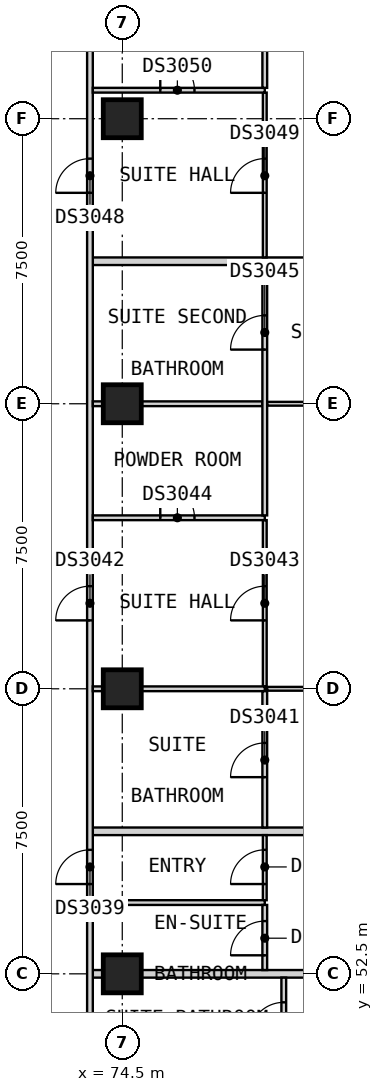
"""IFC4 building model, lengths in metres.
Left out: names, types, materials, properties, quantities, classifications, styles, units other than length and angle.
Written with IfcOpenShell. Run it as: python <this file> out.ifc"""

import sys

from ifc_helpers import new_model, si_unit, direction, frame, frame_2d, origin, origin_2d, place, context, subcontext, project, spatial, rectangle, extrude, element, fill, save


model = new_model("IFC4")
c1 = context("Model", 3, precision=1e-05, world=origin(), true_north=direction((0.0, 1.0)))
c2 = subcontext(c1, "Body", "Model", "MODEL_VIEW")
j1 = project(units=[si_unit("LENGTHUNIT", "METRE"), si_unit("PLANEANGLEUNIT", "RADIAN")], contexts=[c1])
p1 = place(None, origin())
s1 = spatial("IfcSite", under=j1, at=p1, CompositionType="ELEMENT")
p2 = place(p1, origin())
s2 = spatial("IfcBuilding", under=s1, at=p2, CompositionType="ELEMENT")
p3 = place(p2, frame((0.0, 0.0, 137.4)))
s3 = spatial("IfcBuildingStorey", under=s2, at=p3, CompositionType="ELEMENT", Elevation=137.4)
for number, where, z_axis, x_axis in (
    (1, (74.5, 52.5, 0.0), (0.0, 0.0, 1.0), (1.0, 0.0, 0.0)),
    (2, (74.5, 60.0, 0.0), (0.0, 0.0, 1.0), (1.0, 0.0, 0.0)),
    (3, (74.5, 67.5, 0.0), (0.0, 0.0, 1.0), (1.0, 0.0, 0.0)),
    (4, (74.5, 75.0, 0.0), (0.0, 0.0, 1.0), (1.0, 0.0, 0.0)),
):
    element("IfcColumn", number, at=place(p3, frame(where, z_axis=z_axis, x_axis=x_axis)), inside=s3, PredefinedType="COLUMN", context=c2, shape_type="SweptSolid", body=[
        extrude(rectangle(XDim=1.0, YDim=1.0, at=origin_2d()), origin(), (0.0, 0.0, 1.0), 3.6),
    ])
p4 = place(p3, frame((73.725, 52.5, 0.0), z_axis=(0.0, 0.0, 1.0), x_axis=(1.0, 0.0, 0.0)))
e5 = element("IfcWall", 5, at=p4, inside=s3, PredefinedType="PARTITIONING", context=c2, shape_type="SweptSolid", body=[
    extrude(rectangle(XDim=12.525, YDim=0.2, at=frame_2d((6.262, 0.0))), origin(), (0.0, 0.0, 1.0), 3.35),
])
for number, where, z_axis, x_axis in (
    (6, (73.725, 56.25, 0.0), (0.0, 0.0, 1.0), (1.0, 0.0, 0.0)),
    (7, (73.725, 71.25, 0.0), (0.0, 0.0, 1.0), (1.0, 0.0, 0.0)),
):
    element("IfcWall", number, at=place(p3, frame(where, z_axis=z_axis, x_axis=x_axis)), inside=s3, PredefinedType="PARTITIONING", context=c2, shape_type="SweptSolid", body=[
        extrude(rectangle(XDim=11.715, YDim=0.2, at=frame_2d((5.857, 0.0))), origin(), (0.0, 0.0, 1.0), 3.35),
    ])
p5 = place(p3, frame((73.65, 50.175, 0.0), z_axis=(0.0, 0.0, 1.0), x_axis=(0.0, 1.0, 0.0)))
e8 = element("IfcWall", 8, at=p5, inside=s3, PredefinedType="PARTITIONING", context=c2, shape_type="SweptSolid", body=[
    extrude(rectangle(XDim=38.4, YDim=0.15, at=frame_2d((19.2, 0.0))), origin(), (0.0, 0.0, 1.0), 3.35),
])
p6 = place(p5, frame((4.688, 0.0, 0.0)))
e9 = element("IfcOpeningElement", 9, at=p6, cuts=e8, PredefinedType="OPENING", context=c2, shape_type="SweptSolid", body=[
    extrude(rectangle(XDim=0.9, YDim=2.1, at=frame_2d((0.45, 1.05))), frame((0.0, 0.085, 0.0), z_axis=(0.0, -1.0, 0.0), x_axis=(1.0, 0.0, 0.0)), (0.0, 0.0, 1.0), 0.17),
])
p7 = place(p5, frame((11.625, 0.0, 0.0)))
e10 = element("IfcOpeningElement", 10, at=p7, cuts=e8, PredefinedType="OPENING", context=c2, shape_type="SweptSolid", body=[
    extrude(rectangle(XDim=0.9, YDim=2.1, at=frame_2d((0.45, 1.05))), frame((0.0, 0.085, 0.0), z_axis=(0.0, -1.0, 0.0), x_axis=(1.0, 0.0, 0.0)), (0.0, 0.0, 1.0), 0.17),
])
p8 = place(p5, frame((22.875, 0.0, 0.0)))
e11 = element("IfcOpeningElement", 11, at=p8, cuts=e8, PredefinedType="OPENING", context=c2, shape_type="SweptSolid", body=[
    extrude(rectangle(XDim=0.9, YDim=2.1, at=frame_2d((0.45, 1.05))), frame((0.0, 0.085, 0.0), z_axis=(0.0, -1.0, 0.0), x_axis=(1.0, 0.0, 0.0)), (0.0, 0.0, 1.0), 0.17),
])
p9 = place(p5, frame((34.688, 0.0, 0.0)))
e12 = element("IfcOpeningElement", 12, at=p9, cuts=e8, PredefinedType="OPENING", context=c2, shape_type="SweptSolid", body=[
    extrude(rectangle(XDim=0.9, YDim=2.1, at=frame_2d((0.45, 1.05))), frame((0.0, 0.085, 0.0), z_axis=(0.0, -1.0, 0.0), x_axis=(1.0, 0.0, 0.0)), (0.0, 0.0, 1.0), 0.17),
])
p10 = place(p3, frame((78.312, 60.0, 0.0), z_axis=(0.0, 0.0, 1.0), x_axis=(1.0, 0.0, 0.0)))
e13 = element("IfcWall", 13, at=p10, inside=s3, PredefinedType="PARTITIONING", context=c2, shape_type="SweptSolid", body=[
    extrude(rectangle(XDim=7.938, YDim=0.1, at=frame_2d((3.969, 0.0))), origin(), (0.0, 0.0, 1.0), 3.35),
])
p11 = place(p10, frame((4.238, 0.0, 0.0)))
e14 = element("IfcOpeningElement", 14, at=p11, cuts=e13, PredefinedType="OPENING", context=c2, shape_type="SweptSolid", body=[
    extrude(rectangle(XDim=0.9, YDim=2.1, at=frame_2d((0.45, 1.05))), frame((0.0, 0.06, 0.0), z_axis=(0.0, -1.0, 0.0), x_axis=(1.0, 0.0, 0.0)), (0.0, 0.0, 1.0), 0.12),
])
p12 = place(p3, frame((78.312, 67.5, 0.0), z_axis=(0.0, 0.0, 1.0), x_axis=(1.0, 0.0, 0.0)))
e15 = element("IfcWall", 15, at=p12, inside=s3, PredefinedType="PARTITIONING", context=c2, shape_type="SweptSolid", body=[
    extrude(rectangle(XDim=7.938, YDim=0.1, at=frame_2d((3.969, 0.0))), origin(), (0.0, 0.0, 1.0), 3.35),
])
p13 = place(p12, frame((4.238, 0.0, 0.0)))
e16 = element("IfcOpeningElement", 16, at=p13, cuts=e15, PredefinedType="OPENING", context=c2, shape_type="SweptSolid", body=[
    extrude(rectangle(XDim=0.9, YDim=2.1, at=frame_2d((0.45, 1.05))), frame((0.0, 0.06, 0.0), z_axis=(0.0, -1.0, 0.0), x_axis=(1.0, 0.0, 0.0)), (0.0, 0.0, 1.0), 0.12),
])
p14 = place(p3, frame((78.25, 54.438, 0.0), z_axis=(0.0, 0.0, 1.0), x_axis=(0.0, 1.0, 0.0)))
e17 = element("IfcWall", 17, at=p14, inside=s3, PredefinedType="PARTITIONING", context=c2, shape_type="SweptSolid", body=[
    extrude(rectangle(XDim=1.712, YDim=0.1, at=frame_2d((0.856, 0.0))), origin(), (0.0, 0.0, 1.0), 3.35),
])
p15 = place(p14, frame((0.425, 0.0, 0.0)))
e18 = element("IfcOpeningElement", 18, at=p15, cuts=e17, PredefinedType="OPENING", context=c2, shape_type="SweptSolid", body=[
    extrude(rectangle(XDim=0.9, YDim=2.1, at=frame_2d((0.45, 1.05))), frame((0.0, 0.06, 0.0), z_axis=(0.0, -1.0, 0.0), x_axis=(1.0, 0.0, 0.0)), (0.0, 0.0, 1.0), 0.12),
])
p16 = place(p3, frame((78.25, 60.062, 0.0), z_axis=(0.0, 0.0, 1.0), x_axis=(0.0, 1.0, 0.0)))
e19 = element("IfcWall", 19, at=p16, inside=s3, PredefinedType="PARTITIONING", context=c2, shape_type="SweptSolid", body=[
    extrude(rectangle(XDim=4.375, YDim=0.1, at=frame_2d((2.188, 0.0))), origin(), (0.0, 0.0, 1.0), 3.35),
])
p17 = place(p16, frame((1.738, 0.0, 0.0)))
e20 = element("IfcOpeningElement", 20, at=p17, cuts=e19, PredefinedType="OPENING", context=c2, shape_type="SweptSolid", body=[
    extrude(rectangle(XDim=0.9, YDim=2.1, at=frame_2d((0.45, 1.05))), frame((0.0, 0.06, 0.0), z_axis=(0.0, -1.0, 0.0), x_axis=(1.0, 0.0, 0.0)), (0.0, 0.0, 1.0), 0.12),
])
p18 = place(p3, frame((78.25, 71.35, 0.0), z_axis=(0.0, 0.0, 1.0), x_axis=(0.0, 1.0, 0.0)))
e21 = element("IfcWall", 21, at=p18, inside=s3, PredefinedType="PARTITIONING", context=c2, shape_type="SweptSolid", body=[
    extrude(rectangle(XDim=4.337, YDim=0.1, at=frame_2d((2.169, 0.0))), origin(), (0.0, 0.0, 1.0), 3.35),
])
p19 = place(p18, frame((1.7, 0.0, 0.0)))
e22 = element("IfcOpeningElement", 22, at=p19, cuts=e21, PredefinedType="OPENING", context=c2, shape_type="SweptSolid", body=[
    extrude(rectangle(XDim=0.9, YDim=2.1, at=frame_2d((0.45, 1.05))), frame((0.0, 0.06, 0.0), z_axis=(0.0, -1.0, 0.0), x_axis=(1.0, 0.0, 0.0)), (0.0, 0.0, 1.0), 0.12),
])
for number, where, z_axis, x_axis in (
    (23, (73.725, 54.375, 0.0), (0.0, 0.0, 1.0), (1.0, 0.0, 0.0)),
    (24, (73.725, 60.0, 0.0), (0.0, 0.0, 1.0), (1.0, 0.0, 0.0)),
):
    element("IfcWall", number, at=place(p3, frame(where, z_axis=z_axis, x_axis=x_axis)), inside=s3, PredefinedType="PARTITIONING", context=c2, shape_type="SweptSolid", body=[
        extrude(rectangle(XDim=4.525, YDim=0.125, at=frame_2d((2.262, 0.0))), origin(), (0.0, 0.0, 1.0), 3.35),
    ])
p20 = place(p3, frame((73.725, 64.5, 0.0), z_axis=(0.0, 0.0, 1.0), x_axis=(1.0, 0.0, 0.0)))
e25 = element("IfcWall", 25, at=p20, inside=s3, PredefinedType="PARTITIONING", context=c2, shape_type="SweptSolid", body=[
    extrude(rectangle(XDim=4.525, YDim=0.125, at=frame_2d((2.262, 0.0))), origin(), (0.0, 0.0, 1.0), 3.35),
])
p21 = place(p20, frame((1.775, 0.0, 0.0)))
e26 = element("IfcOpeningElement", 26, at=p21, cuts=e25, PredefinedType="OPENING", context=c2, shape_type="SweptSolid", body=[
    extrude(rectangle(XDim=0.9, YDim=2.1, at=frame_2d((0.45, 1.05))), frame((0.0, 0.073, 0.0), z_axis=(0.0, -1.0, 0.0), x_axis=(1.0, 0.0, 0.0)), (0.0, 0.0, 1.0), 0.145),
])
p22 = place(p3, frame((73.725, 67.5, 0.0), z_axis=(0.0, 0.0, 1.0), x_axis=(1.0, 0.0, 0.0)))
e27 = element("IfcWall", 27, at=p22, inside=s3, PredefinedType="PARTITIONING", context=c2, shape_type="SweptSolid", body=[
    extrude(rectangle(XDim=4.462, YDim=0.125, at=frame_2d((2.231, 0.0))), origin(), (0.0, 0.0, 1.0), 3.35),
])
p23 = place(p3, frame((73.725, 75.75, 0.0), z_axis=(0.0, 0.0, 1.0), x_axis=(1.0, 0.0, 0.0)))
e28 = element("IfcWall", 28, at=p23, inside=s3, PredefinedType="PARTITIONING", context=c2, shape_type="SweptSolid", body=[
    extrude(rectangle(XDim=4.525, YDim=0.125, at=frame_2d((2.262, 0.0))), origin(), (0.0, 0.0, 1.0), 3.35),
])
p24 = place(p23, frame((1.775, 0.0, 0.0)))
e29 = element("IfcOpeningElement", 29, at=p24, cuts=e28, PredefinedType="OPENING", context=c2, shape_type="SweptSolid", body=[
    extrude(rectangle(XDim=0.9, YDim=2.1, at=frame_2d((0.45, 1.05))), frame((0.0, 0.073, 0.0), z_axis=(0.0, -1.0, 0.0), x_axis=(1.0, 0.0, 0.0)), (0.0, 0.0, 1.0), 0.145),
])
p25 = place(p3, frame((78.25, 52.6, 0.0), z_axis=(0.0, 0.0, 1.0), x_axis=(0.0, 1.0, 0.0)))
e30 = element("IfcWall", 30, at=p25, inside=s3, PredefinedType="PARTITIONING", context=c2, shape_type="SweptSolid", body=[
    extrude(rectangle(XDim=1.712, YDim=0.125, at=frame_2d((0.856, 0.0))), origin(), (0.0, 0.0, 1.0), 3.35),
])
p26 = place(p25, frame((0.387, 0.0, 0.0)))
e31 = element("IfcOpeningElement", 31, at=p26, cuts=e30, PredefinedType="OPENING", context=c2, shape_type="SweptSolid", body=[
    extrude(rectangle(XDim=0.9, YDim=2.1, at=frame_2d((0.45, 1.05))), frame((0.0, 0.073, 0.0), z_axis=(0.0, -1.0, 0.0), x_axis=(1.0, 0.0, 0.0)), (0.0, 0.0, 1.0), 0.145),
])
p27 = place(p3, frame((78.25, 56.35, 0.0), z_axis=(0.0, 0.0, 1.0), x_axis=(0.0, 1.0, 0.0)))
e32 = element("IfcWall", 32, at=p27, inside=s3, PredefinedType="PARTITIONING", context=c2, shape_type="SweptSolid", body=[
    extrude(rectangle(XDim=3.587, YDim=0.125, at=frame_2d((1.794, 0.0))), origin(), (0.0, 0.0, 1.0), 3.35),
])
p28 = place(p27, frame((1.325, 0.0, 0.0)))
e33 = element("IfcOpeningElement", 33, at=p28, cuts=e32, PredefinedType="OPENING", context=c2, shape_type="SweptSolid", body=[
    extrude(rectangle(XDim=0.9, YDim=2.1, at=frame_2d((0.45, 1.05))), frame((0.0, 0.073, 0.0), z_axis=(0.0, -1.0, 0.0), x_axis=(1.0, 0.0, 0.0)), (0.0, 0.0, 1.0), 0.145),
])
p29 = place(p3, frame((78.25, 64.562, 0.0), z_axis=(0.0, 0.0, 1.0), x_axis=(0.0, 1.0, 0.0)))
e34 = element("IfcWall", 34, at=p29, inside=s3, PredefinedType="PARTITIONING", context=c2, shape_type="SweptSolid", body=[
    extrude(rectangle(XDim=6.587, YDim=0.125, at=frame_2d((3.294, 0.0))), origin(), (0.0, 0.0, 1.0), 3.35),
])
p30 = place(p29, frame((4.363, 0.0, 0.0)))
e35 = element("IfcOpeningElement", 35, at=p30, cuts=e34, PredefinedType="OPENING", context=c2, shape_type="SweptSolid", body=[
    extrude(rectangle(XDim=0.9, YDim=2.1, at=frame_2d((0.45, 1.05))), frame((0.0, 0.073, 0.0), z_axis=(0.0, -1.0, 0.0), x_axis=(1.0, 0.0, 0.0)), (0.0, 0.0, 1.0), 0.145),
])
p31 = place(p3, frame((78.25, 75.812, 0.0), z_axis=(0.0, 0.0, 1.0), x_axis=(0.0, 1.0, 0.0)))
e36 = element("IfcWall", 36, at=p31, inside=s3, PredefinedType="PARTITIONING", context=c2, shape_type="SweptSolid", body=[
    extrude(rectangle(XDim=8.5, YDim=0.125, at=frame_2d((4.25, 0.0))), origin(), (0.0, 0.0, 1.0), 3.35),
])
p32 = place(p31, frame((4.363, 0.0, 0.0)))
e37 = element("IfcOpeningElement", 37, at=p32, cuts=e36, PredefinedType="OPENING", context=c2, shape_type="SweptSolid", body=[
    extrude(rectangle(XDim=0.9, YDim=2.1, at=frame_2d((0.45, 1.05))), frame((0.0, 0.073, 0.0), z_axis=(0.0, -1.0, 0.0), x_axis=(1.0, 0.0, 0.0)), (0.0, 0.0, 1.0), 0.145),
])
p33 = place(p31, frame((7.175, 0.0, 0.0)))
e38 = element("IfcOpeningElement", 38, at=p33, cuts=e36, PredefinedType="OPENING", context=c2, shape_type="SweptSolid", body=[
    extrude(rectangle(XDim=0.9, YDim=2.1, at=frame_2d((0.45, 1.05))), frame((0.0, 0.073, 0.0), z_axis=(0.0, -1.0, 0.0), x_axis=(1.0, 0.0, 0.0)), (0.0, 0.0, 1.0), 0.145),
])
p34 = place(p3, frame((78.75, 50.163, 0.0), z_axis=(0.0, 0.0, 1.0), x_axis=(0.0, 1.0, 0.0)))
e39 = element("IfcWall", 39, at=p34, inside=s3, PredefinedType="PARTITIONING", context=c2, shape_type="SweptSolid", body=[
    extrude(rectangle(XDim=2.237, YDim=0.125, at=frame_2d((1.119, 0.0))), origin(), (0.0, 0.0, 1.0), 3.35),
])
p35 = place(p34, frame((0.688, 0.0, 0.0)))
e40 = element("IfcOpeningElement", 40, at=p35, cuts=e39, PredefinedType="OPENING", context=c2, shape_type="SweptSolid", body=[
    extrude(rectangle(XDim=0.9, YDim=2.1, at=frame_2d((0.45, 1.05))), frame((0.0, 0.073, 0.0), z_axis=(0.0, -1.0, 0.0), x_axis=(1.0, 0.0, 0.0)), (0.0, 0.0, 1.0), 0.145),
])
p36 = place(p26, origin())
e41 = element("IfcDoor", 41, at=p36, inside=s3, OperationType="SINGLE_SWING_LEFT", PredefinedType="DOOR", context=c2, shape_type="SweptSolid", body=[
    extrude(rectangle(XDim=0.9, YDim=2.1, at=frame_2d((0.45, 1.05))), frame((0.0, 0.025, 0.0), z_axis=(0.0, -1.0, 0.0), x_axis=(1.0, 0.0, 0.0)), (0.0, 0.0, 1.0), 0.05),
])
fill(e31, e41)
p37 = place(p6, origin())
e42 = element("IfcDoor", 42, at=p37, inside=s3, OperationType="SINGLE_SWING_RIGHT", PredefinedType="DOOR", context=c2, shape_type="SweptSolid", body=[
    extrude(rectangle(XDim=0.9, YDim=2.1, at=frame_2d((0.45, 1.05))), frame((0.0, 0.025, 0.0), z_axis=(0.0, -1.0, 0.0), x_axis=(1.0, 0.0, 0.0)), (0.0, 0.0, 1.0), 0.05),
])
fill(e9, e42)
p38 = place(p15, origin())
e43 = element("IfcDoor", 43, at=p38, inside=s3, OperationType="SINGLE_SWING_LEFT", PredefinedType="DOOR", context=c2, shape_type="SweptSolid", body=[
    extrude(rectangle(XDim=0.9, YDim=2.1, at=frame_2d((0.45, 1.05))), frame((0.0, 0.025, 0.0), z_axis=(0.0, -1.0, 0.0), x_axis=(1.0, 0.0, 0.0)), (0.0, 0.0, 1.0), 0.05),
])
fill(e18, e43)
p39 = place(p28, origin())
e44 = element("IfcDoor", 44, at=p39, inside=s3, OperationType="SINGLE_SWING_LEFT", PredefinedType="DOOR", context=c2, shape_type="SweptSolid", body=[
    extrude(rectangle(XDim=0.9, YDim=2.1, at=frame_2d((0.45, 1.05))), frame((0.0, 0.025, 0.0), z_axis=(0.0, -1.0, 0.0), x_axis=(1.0, 0.0, 0.0)), (0.0, 0.0, 1.0), 0.05),
])
fill(e33, e44)
p40 = place(p7, origin())
e45 = element("IfcDoor", 45, at=p40, inside=s3, OperationType="SINGLE_SWING_RIGHT", PredefinedType="DOOR", context=c2, shape_type="SweptSolid", body=[
    extrude(rectangle(XDim=0.9, YDim=2.1, at=frame_2d((0.45, 1.05))), frame((0.0, 0.025, 0.0), z_axis=(0.0, -1.0, 0.0), x_axis=(1.0, 0.0, 0.0)), (0.0, 0.0, 1.0), 0.05),
])
fill(e10, e45)
p41 = place(p17, origin())
e46 = element("IfcDoor", 46, at=p41, inside=s3, OperationType="SINGLE_SWING_LEFT", PredefinedType="DOOR", context=c2, shape_type="SweptSolid", body=[
    extrude(rectangle(XDim=0.9, YDim=2.1, at=frame_2d((0.45, 1.05))), frame((0.0, 0.025, 0.0), z_axis=(0.0, -1.0, 0.0), x_axis=(1.0, 0.0, 0.0)), (0.0, 0.0, 1.0), 0.05),
])
fill(e20, e46)
p42 = place(p21, origin())
e47 = element("IfcDoor", 47, at=p42, inside=s3, OperationType="SINGLE_SWING_RIGHT", PredefinedType="DOOR", context=c2, shape_type="SweptSolid", body=[
    extrude(rectangle(XDim=0.9, YDim=2.1, at=frame_2d((0.45, 1.05))), frame((0.0, 0.025, 0.0), z_axis=(0.0, -1.0, 0.0), x_axis=(1.0, 0.0, 0.0)), (0.0, 0.0, 1.0), 0.05),
])
fill(e26, e47)
p43 = place(p30, origin())
e48 = element("IfcDoor", 48, at=p43, inside=s3, OperationType="SINGLE_SWING_LEFT", PredefinedType="DOOR", context=c2, shape_type="SweptSolid", body=[
    extrude(rectangle(XDim=0.9, YDim=2.1, at=frame_2d((0.45, 1.05))), frame((0.0, 0.025, 0.0), z_axis=(0.0, -1.0, 0.0), x_axis=(1.0, 0.0, 0.0)), (0.0, 0.0, 1.0), 0.05),
])
fill(e35, e48)
p44 = place(p8, origin())
e49 = element("IfcDoor", 49, at=p44, inside=s3, OperationType="SINGLE_SWING_RIGHT", PredefinedType="DOOR", context=c2, shape_type="SweptSolid", body=[
    extrude(rectangle(XDim=0.9, YDim=2.1, at=frame_2d((0.45, 1.05))), frame((0.0, 0.025, 0.0), z_axis=(0.0, -1.0, 0.0), x_axis=(1.0, 0.0, 0.0)), (0.0, 0.0, 1.0), 0.05),
])
fill(e11, e49)
p45 = place(p19, origin())
e50 = element("IfcDoor", 50, at=p45, inside=s3, OperationType="SINGLE_SWING_LEFT", PredefinedType="DOOR", context=c2, shape_type="SweptSolid", body=[
    extrude(rectangle(XDim=0.9, YDim=2.1, at=frame_2d((0.45, 1.05))), frame((0.0, 0.025, 0.0), z_axis=(0.0, -1.0, 0.0), x_axis=(1.0, 0.0, 0.0)), (0.0, 0.0, 1.0), 0.05),
])
fill(e22, e50)
p46 = place(p24, origin())
e51 = element("IfcDoor", 51, at=p46, inside=s3, OperationType="SINGLE_SWING_RIGHT", PredefinedType="DOOR", context=c2, shape_type="SweptSolid", body=[
    extrude(rectangle(XDim=0.9, YDim=2.1, at=frame_2d((0.45, 1.05))), frame((0.0, 0.025, 0.0), z_axis=(0.0, -1.0, 0.0), x_axis=(1.0, 0.0, 0.0)), (0.0, 0.0, 1.0), 0.05),
])
fill(e29, e51)
p47 = place(p35, origin())
e52 = element("IfcDoor", 52, at=p47, inside=s3, OperationType="SINGLE_SWING_LEFT", PredefinedType="DOOR", context=c2, shape_type="SweptSolid", body=[
    extrude(rectangle(XDim=0.9, YDim=2.1, at=frame_2d((0.45, 1.05))), frame((0.0, 0.025, 0.0), z_axis=(0.0, -1.0, 0.0), x_axis=(1.0, 0.0, 0.0)), (0.0, 0.0, 1.0), 0.05),
])
fill(e40, e52)
save(model, sys.argv[1])
